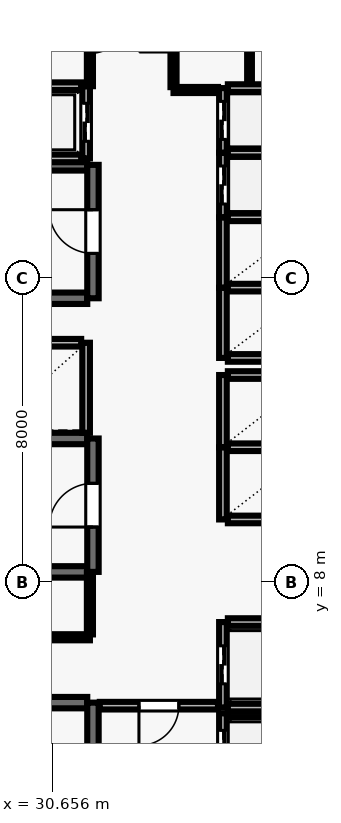
"""IFC4 building model, lengths in metres.
Left out: names, types, materials, properties, quantities, classifications, styles, units other than length and angle.
Written with IfcOpenShell. Run it as: python <this file> out.ifc"""

import sys

from ifc_helpers import new_model, si_unit, direction, frame, frame_2d, origin, place, context, subcontext, project, spatial, rectangle, extrude, element, fill, save


model = new_model("IFC4")
c1 = context("Model", 3, precision=1e-05, world=origin(), true_north=direction((0.0, 1.0)))
c2 = subcontext(c1, "Body", "Model", "MODEL_VIEW")
j1 = project(units=[si_unit("LENGTHUNIT", "METRE"), si_unit("PLANEANGLEUNIT", "RADIAN")], contexts=[c1])
p1 = place(None, origin())
s1 = spatial("IfcSite", under=j1, at=p1, CompositionType="ELEMENT")
p2 = place(p1, origin())
s2 = spatial("IfcBuilding", under=s1, at=p2, CompositionType="ELEMENT")
p3 = place(p2, frame((0.0, 0.0, 107.3)))
s3 = spatial("IfcBuildingStorey", under=s2, at=p3, CompositionType="ELEMENT", Elevation=107.3)
p4 = place(p3, frame((31.58, 4.83, 0.0), z_axis=(0.0, 0.0, 1.0), x_axis=(-1.0, 0.0, 0.0)))
e1 = element("IfcWall", 1, at=p4, inside=s3, PredefinedType="SHEAR", context=c2, shape_type="SweptSolid", body=[
    extrude(rectangle(XDim=8.36, YDim=0.3, at=frame_2d((4.18, 0.0))), origin(), (0.0, 0.0, 1.0), 3.69),
])
p5 = place(p3, frame((31.73, 0.96, 0.0), z_axis=(0.0, 0.0, 1.0), x_axis=(0.0, 1.0, 0.0)))
e2 = element("IfcWall", 2, at=p5, inside=s3, PredefinedType="SHEAR", context=c2, shape_type="SweptSolid", body=[
    extrude(rectangle(XDim=3.87, YDim=0.3, at=frame_2d((1.935, 0.0))), origin(), (0.0, 0.0, 1.0), 3.69),
])
p6 = place(p5, frame((1.54, 0.0, 0.0)))
e3 = element("IfcOpeningElement", 3, at=p6, cuts=e2, PredefinedType="OPENING", context=c2, shape_type="SweptSolid", body=[
    extrude(rectangle(XDim=1.15, YDim=2.15, at=frame_2d((0.575, 1.075))), frame((0.0, 0.16, 0.0), z_axis=(0.0, -1.0, 0.0), x_axis=(1.0, 0.0, 0.0)), (0.0, 0.0, 1.0), 0.32),
])
for number, where, z_axis, x_axis in (
    (4, (31.58, 18.98, 0.0), (0.0, 0.0, 1.0), (-1.0, 0.0, 0.0)),
    (5, (23.22, 15.47, 0.0), (0.0, 0.0, 1.0), (1.0, 0.0, 0.0)),
):
    element("IfcWall", number, at=place(p3, frame(where, z_axis=z_axis, x_axis=x_axis)), inside=s3, PredefinedType="SHEAR", context=c2, shape_type="SweptSolid", body=[
        extrude(rectangle(XDim=8.36, YDim=0.3, at=frame_2d((4.18, 0.0))), origin(), (0.0, 0.0, 1.0), 3.69),
    ])
p7 = place(p3, frame((31.73, 15.47, 0.0), z_axis=(0.0, 0.0, 1.0), x_axis=(0.0, 1.0, 0.0)))
e6 = element("IfcWall", 6, at=p7, inside=s3, PredefinedType="SHEAR", context=c2, shape_type="SweptSolid", body=[
    extrude(rectangle(XDim=3.51, YDim=0.3, at=frame_2d((1.755, 0.0))), origin(), (0.0, 0.0, 1.0), 3.69),
])
p8 = place(p7, frame((1.18, 0.0, 0.0)))
e7 = element("IfcOpeningElement", 7, at=p8, cuts=e6, PredefinedType="OPENING", context=c2, shape_type="SweptSolid", body=[
    extrude(rectangle(XDim=1.15, YDim=2.15, at=frame_2d((0.575, 1.075))), frame((0.0, 0.16, 0.0), z_axis=(0.0, -1.0, 0.0), x_axis=(1.0, 0.0, 0.0)), (0.0, 0.0, 1.0), 0.32),
])
for number, where, z_axis, x_axis in (
    (8, (31.58, 11.78, 0.0), (0.0, 0.0, 1.0), (-1.0, 0.0, 0.0)),
    (9, (23.22, 8.27, 0.0), (0.0, 0.0, 1.0), (1.0, 0.0, 0.0)),
):
    element("IfcWall", number, at=place(p3, frame(where, z_axis=z_axis, x_axis=x_axis)), inside=s3, PredefinedType="SHEAR", context=c2, shape_type="SweptSolid", body=[
        extrude(rectangle(XDim=8.36, YDim=0.3, at=frame_2d((4.18, 0.0))), origin(), (0.0, 0.0, 1.0), 3.69),
    ])
p9 = place(p3, frame((31.73, 8.27, 0.0), z_axis=(0.0, 0.0, 1.0), x_axis=(0.0, 1.0, 0.0)))
e10 = element("IfcWall", 10, at=p9, inside=s3, PredefinedType="SHEAR", context=c2, shape_type="SweptSolid", body=[
    extrude(rectangle(XDim=3.51, YDim=0.3, at=frame_2d((1.755, 0.0))), origin(), (0.0, 0.0, 1.0), 3.69),
])
p10 = place(p9, frame((1.18, 0.0, 0.0)))
e11 = element("IfcOpeningElement", 11, at=p10, cuts=e10, PredefinedType="OPENING", context=c2, shape_type="SweptSolid", body=[
    extrude(rectangle(XDim=1.15, YDim=2.15, at=frame_2d((0.575, 1.075))), frame((0.0, 0.16, 0.0), z_axis=(0.0, -1.0, 0.0), x_axis=(1.0, 0.0, 0.0)), (0.0, 0.0, 1.0), 0.32),
])
p11 = place(p3, frame((35.15, 4.55, 0.0), z_axis=(0.0, 0.0, 1.0), x_axis=(0.0, -1.0, 0.0)))
e12 = element("IfcWall", 12, at=p11, inside=s3, PredefinedType="SOLIDWALL", context=c2, shape_type="SweptSolid", body=[
    extrude(rectangle(XDim=2.1, YDim=0.2, at=frame_2d((1.05, 0.0))), origin(), (0.0, 0.0, 1.0), 3.69),
])
p12 = place(p11, frame((0.45, 0.0, 0.0)))
e13 = element("IfcOpeningElement", 13, at=p12, cuts=e12, PredefinedType="OPENING", context=c2, shape_type="SweptSolid", body=[
    extrude(rectangle(XDim=1.2, YDim=2.15, at=frame_2d((0.6, 1.075))), frame((0.0, 0.11, 0.0), z_axis=(0.0, -1.0, 0.0), x_axis=(1.0, 0.0, 0.0)), (0.0, 0.0, 1.0), 0.22),
])
p13 = place(p3, frame((37.42, 4.55, 0.0), z_axis=(0.0, 0.0, 1.0), x_axis=(-1.0, 0.0, 0.0)))
e14 = element("IfcWall", 14, at=p13, inside=s3, PredefinedType="SOLIDWALL", context=c2, shape_type="SweptSolid", body=[
    extrude(rectangle(XDim=2.14, YDim=0.2, at=frame_2d((1.07, 0.0))), origin(), (0.0, 0.0, 1.0), 3.69),
])
p14 = place(p3, frame((35.15, 6.95, 0.0), z_axis=(0.0, 0.0, 1.0), x_axis=(0.0, -1.0, 0.0)))
e15 = element("IfcWall", 15, at=p14, inside=s3, PredefinedType="SOLIDWALL", context=c2, shape_type="SweptSolid", body=[
    extrude(rectangle(XDim=2.25, YDim=0.2, at=frame_2d((1.125, 0.0))), origin(), (0.0, 0.0, 1.0), 3.69),
])
p15 = place(p14, frame((0.625, 0.0, 0.0)))
e16 = element("IfcOpeningElement", 16, at=p15, cuts=e15, PredefinedType="OPENING", context=c2, shape_type="SweptSolid", body=[
    extrude(rectangle(XDim=1.0, YDim=2.1, at=frame_2d((0.5, 1.05))), frame((0.0, 0.11, 0.0), z_axis=(0.0, -1.0, 0.0), x_axis=(1.0, 0.0, 0.0)), (0.0, 0.0, 1.0), 0.22),
])
for number, where, z_axis, x_axis in (
    (17, (35.28, 4.7, 0.0), (0.0, 0.0, 1.0), (1.0, 0.0, 0.0)),
    (18, (37.42, 6.95, 0.0), (0.0, 0.0, 1.0), (-1.0, 0.0, 0.0)),
):
    element("IfcWall", number, at=place(p3, frame(where, z_axis=z_axis, x_axis=x_axis)), inside=s3, PredefinedType="SOLIDWALL", context=c2, shape_type="SweptSolid", body=[
        extrude(rectangle(XDim=2.14, YDim=0.2, at=frame_2d((1.07, 0.0))), origin(), (0.0, 0.0, 1.0), 3.69),
    ])
p16 = place(p3, frame((35.15, 11.55, 0.0), z_axis=(0.0, 0.0, 1.0), x_axis=(0.0, -1.0, 0.0)))
e19 = element("IfcWall", 19, at=p16, inside=s3, PredefinedType="SOLIDWALL", context=c2, shape_type="SweptSolid", body=[
    extrude(rectangle(XDim=1.9, YDim=0.2, at=frame_2d((0.95, 0.0))), origin(), (0.0, 0.0, 1.0), 3.69),
])
for number, where, z_axis, x_axis in (
    (20, (35.28, 9.65, 0.0), (0.0, 0.0, 1.0), (1.0, 0.0, 0.0)),
    (21, (37.42, 11.55, 0.0), (0.0, 0.0, 1.0), (-1.0, 0.0, 0.0)),
):
    element("IfcWall", number, at=place(p3, frame(where, z_axis=z_axis, x_axis=x_axis)), inside=s3, PredefinedType="SOLIDWALL", context=c2, shape_type="SweptSolid", body=[
        extrude(rectangle(XDim=2.14, YDim=0.2, at=frame_2d((1.07, 0.0))), origin(), (0.0, 0.0, 1.0), 3.69),
    ])
p17 = place(p3, frame((35.15, 13.45, 0.0), z_axis=(0.0, 0.0, 1.0), x_axis=(0.0, -1.0, 0.0)))
e22 = element("IfcWall", 22, at=p17, inside=s3, PredefinedType="SOLIDWALL", context=c2, shape_type="SweptSolid", body=[
    extrude(rectangle(XDim=1.9, YDim=0.2, at=frame_2d((0.95, 0.0))), origin(), (0.0, 0.0, 1.0), 3.69),
])
p18 = place(p3, frame((37.42, 13.45, 0.0), z_axis=(0.0, 0.0, 1.0), x_axis=(-1.0, 0.0, 0.0)))
e23 = element("IfcWall", 23, at=p18, inside=s3, PredefinedType="SOLIDWALL", context=c2, shape_type="SweptSolid", body=[
    extrude(rectangle(XDim=2.14, YDim=0.2, at=frame_2d((1.07, 0.0))), origin(), (0.0, 0.0, 1.0), 3.69),
])
p19 = place(p3, frame((31.55, 11.93, 0.0), z_axis=(0.0, 0.0, 1.0), x_axis=(0.0, 1.0, 0.0)))
e24 = element("IfcWall", 24, at=p19, inside=s3, PredefinedType="SOLIDWALL", context=c2, shape_type="SweptSolid", body=[
    extrude(rectangle(XDim=2.37, YDim=0.2, at=frame_2d((1.185, 0.0))), origin(), (0.0, 0.0, 1.0), 3.69),
])
p20 = place(p3, frame((31.42, 14.3, 0.0), z_axis=(0.0, 0.0, 1.0), x_axis=(-1.0, 0.0, 0.0)))
e25 = element("IfcWall", 25, at=p20, inside=s3, PredefinedType="SOLIDWALL", context=c2, shape_type="SweptSolid", body=[
    extrude(rectangle(XDim=2.44, YDim=0.2, at=frame_2d((1.22, 0.0))), origin(), (0.0, 0.0, 1.0), 3.69),
])
p21 = place(p3, frame((35.15, 15.75, 0.0), z_axis=(0.0, 0.0, 1.0), x_axis=(0.0, -1.0, 0.0)))
e26 = element("IfcWall", 26, at=p21, inside=s3, PredefinedType="SOLIDWALL", context=c2, shape_type="SweptSolid", body=[
    extrude(rectangle(XDim=1.85, YDim=0.2, at=frame_2d((0.925, 0.0))), origin(), (0.0, 0.0, 1.0), 3.69),
])
for number, where, z_axis, x_axis in (
    (27, (35.28, 13.9, 0.0), (0.0, 0.0, 1.0), (1.0, 0.0, 0.0)),
    (28, (37.42, 15.75, 0.0), (0.0, 0.0, 1.0), (-1.0, 0.0, 0.0)),
):
    element("IfcWall", number, at=place(p3, frame(where, z_axis=z_axis, x_axis=x_axis)), inside=s3, PredefinedType="SOLIDWALL", context=c2, shape_type="SweptSolid", body=[
        extrude(rectangle(XDim=2.14, YDim=0.2, at=frame_2d((1.07, 0.0))), origin(), (0.0, 0.0, 1.0), 3.69),
    ])
p22 = place(p3, frame((35.15, 17.6, 0.0), z_axis=(0.0, 0.0, 1.0), x_axis=(0.0, -1.0, 0.0)))
e29 = element("IfcWall", 29, at=p22, inside=s3, PredefinedType="SOLIDWALL", context=c2, shape_type="SweptSolid", body=[
    extrude(rectangle(XDim=1.85, YDim=0.2, at=frame_2d((0.925, 0.0))), origin(), (0.0, 0.0, 1.0), 3.69),
])
p23 = place(p3, frame((37.42, 17.6, 0.0), z_axis=(0.0, 0.0, 1.0), x_axis=(-1.0, 0.0, 0.0)))
e30 = element("IfcWall", 30, at=p23, inside=s3, PredefinedType="SOLIDWALL", context=c2, shape_type="SweptSolid", body=[
    extrude(rectangle(XDim=2.14, YDim=0.2, at=frame_2d((1.07, 0.0))), origin(), (0.0, 0.0, 1.0), 3.69),
])
p24 = place(p3, frame((35.15, 19.3, 0.0), z_axis=(0.0, 0.0, 1.0), x_axis=(0.0, -1.0, 0.0)))
e31 = element("IfcWall", 31, at=p24, inside=s3, PredefinedType="SOLIDWALL", context=c2, shape_type="SweptSolid", body=[
    extrude(rectangle(XDim=1.7, YDim=0.2, at=frame_2d((0.85, 0.0))), origin(), (0.0, 0.0, 1.0), 3.69),
])
p25 = place(p24, frame((0.35, 0.0, 0.0)))
e32 = element("IfcOpeningElement", 32, at=p25, cuts=e31, PredefinedType="OPENING", context=c2, shape_type="SweptSolid", body=[
    extrude(rectangle(XDim=1.0, YDim=2.1, at=frame_2d((0.5, 1.05))), frame((0.0, 0.11, 0.0), z_axis=(0.0, -1.0, 0.0), x_axis=(1.0, 0.0, 0.0)), (0.0, 0.0, 1.0), 0.22),
])
p26 = place(p3, frame((37.42, 19.3, 0.0), z_axis=(0.0, 0.0, 1.0), x_axis=(-1.0, 0.0, 0.0)))
e33 = element("IfcWall", 33, at=p26, inside=s3, PredefinedType="SOLIDWALL", context=c2, shape_type="SweptSolid", body=[
    extrude(rectangle(XDim=2.14, YDim=0.2, at=frame_2d((1.07, 0.0))), origin(), (0.0, 0.0, 1.0), 3.69),
])
p27 = place(p3, frame((35.15, 21.0, 0.0), z_axis=(0.0, 0.0, 1.0), x_axis=(0.0, -1.0, 0.0)))
e34 = element("IfcWall", 34, at=p27, inside=s3, PredefinedType="SOLIDWALL", context=c2, shape_type="SweptSolid", body=[
    extrude(rectangle(XDim=1.7, YDim=0.2, at=frame_2d((0.85, 0.0))), origin(), (0.0, 0.0, 1.0), 3.69),
])
p28 = place(p27, frame((0.35, 0.0, 0.0)))
e35 = element("IfcOpeningElement", 35, at=p28, cuts=e34, PredefinedType="OPENING", context=c2, shape_type="SweptSolid", body=[
    extrude(rectangle(XDim=1.0, YDim=2.1, at=frame_2d((0.5, 1.05))), frame((0.0, 0.11, 0.0), z_axis=(0.0, -1.0, 0.0), x_axis=(1.0, 0.0, 0.0)), (0.0, 0.0, 1.0), 0.22),
])
p29 = place(p3, frame((37.42, 21.0, 0.0), z_axis=(0.0, 0.0, 1.0), x_axis=(-1.0, 0.0, 0.0)))
e36 = element("IfcWall", 36, at=p29, inside=s3, PredefinedType="SOLIDWALL", context=c2, shape_type="SweptSolid", body=[
    extrude(rectangle(XDim=2.14, YDim=0.2, at=frame_2d((1.07, 0.0))), origin(), (0.0, 0.0, 1.0), 3.69),
])
p30 = place(p3, frame((31.55, 19.15, 0.0), z_axis=(0.0, 0.0, 1.0), x_axis=(0.0, 1.0, 0.0)))
e37 = element("IfcWall", 37, at=p30, inside=s3, PredefinedType="SOLIDWALL", context=c2, shape_type="SweptSolid", body=[
    extrude(rectangle(XDim=1.9, YDim=0.2, at=frame_2d((0.95, 0.0))), origin(), (0.0, 0.0, 1.0), 3.69),
])
p31 = place(p30, frame((0.45, 0.0, 0.0)))
e38 = element("IfcOpeningElement", 38, at=p31, cuts=e37, PredefinedType="OPENING", context=c2, shape_type="SweptSolid", body=[
    extrude(rectangle(XDim=1.0, YDim=2.1, at=frame_2d((0.5, 1.05))), frame((0.0, 0.11, 0.0), z_axis=(0.0, -1.0, 0.0), x_axis=(1.0, 0.0, 0.0)), (0.0, 0.0, 1.0), 0.22),
])
for number, where, z_axis, x_axis in (
    (39, (28.98, 19.15, 0.0), (0.0, 0.0, 1.0), (1.0, 0.0, 0.0)),
    (40, (31.42, 21.05, 0.0), (0.0, 0.0, 1.0), (-1.0, 0.0, 0.0)),
):
    element("IfcWall", number, at=place(p3, frame(where, z_axis=z_axis, x_axis=x_axis)), inside=s3, PredefinedType="SOLIDWALL", context=c2, shape_type="SweptSolid", body=[
        extrude(rectangle(XDim=2.44, YDim=0.2, at=frame_2d((1.22, 0.0))), origin(), (0.0, 0.0, 1.0), 3.69),
    ])
p32 = place(p3, frame((31.65, 6.55, 0.0), z_axis=(0.0, 0.0, 1.0), x_axis=(-1.0, 0.0, 0.0)))
e41 = element("IfcWall", 41, at=p32, inside=s3, PredefinedType="PARTITIONING", context=c2, shape_type="SweptSolid", body=[
    extrude(rectangle(XDim=4.75, YDim=0.16, at=frame_2d((2.375, 0.0))), origin(), (0.0, 0.0, 1.0), 3.69),
])
p33 = place(p32, frame((1.935, 0.0, 0.0)))
e42 = element("IfcOpeningElement", 42, at=p33, cuts=e41, PredefinedType="OPENING", context=c2, shape_type="SweptSolid", body=[
    extrude(rectangle(XDim=0.88, YDim=2.1, at=frame_2d((0.44, 1.05))), frame((0.0, 0.09, 0.0), z_axis=(0.0, -1.0, 0.0), x_axis=(1.0, 0.0, 0.0)), (0.0, 0.0, 1.0), 0.18),
])
p34 = place(p3, frame((35.02, 4.75, 0.0), z_axis=(0.0, 0.0, 1.0), x_axis=(-1.0, 0.0, 0.0)))
e43 = element("IfcWall", 43, at=p34, inside=s3, PredefinedType="SOLIDWALL", context=c2, shape_type="SweptSolid", body=[
    extrude(rectangle(XDim=3.11, YDim=0.2, at=frame_2d((1.555, 0.0))), origin(), (0.0, 0.0, 1.0), 3.69),
])
p35 = place(p34, frame((1.03, 0.0, 0.0)))
e44 = element("IfcOpeningElement", 44, at=p35, cuts=e43, PredefinedType="OPENING", context=c2, shape_type="SweptSolid", body=[
    extrude(rectangle(XDim=1.05, YDim=2.15, at=frame_2d((0.525, 1.075))), frame((0.0, 0.11, 0.0), z_axis=(0.0, -1.0, 0.0), x_axis=(1.0, 0.0, 0.0)), (0.0, 0.0, 1.0), 0.22),
])
p36 = place(p3, frame((35.02, 20.95, 0.0), z_axis=(0.0, 0.0, 1.0), x_axis=(-1.0, 0.0, 0.0)))
e45 = element("IfcWall", 45, at=p36, inside=s3, PredefinedType="PARTITIONING", context=c2, shape_type="SweptSolid", body=[
    extrude(rectangle(XDim=1.17, YDim=0.16, at=frame_2d((0.585, 0.0))), origin(), (0.0, 0.0, 1.0), 3.69),
])
p37 = place(p3, frame((31.65, 8.24, 0.0), z_axis=(0.0, 0.0, 1.0), x_axis=(0.0, -1.0, 0.0)))
e46 = element("IfcWall", 46, at=p37, inside=s3, PredefinedType="PARTITIONING", context=c2, shape_type="SweptSolid", body=[
    extrude(rectangle(XDim=1.615, YDim=0.16, at=frame_2d((0.808, 0.0))), origin(), (0.0, 0.0, 1.0), 3.69),
])
p38 = place(p3, frame((31.65, 23.775, 0.0), z_axis=(0.0, 0.0, 1.0), x_axis=(0.0, -1.0, 0.0)))
e47 = element("IfcWall", 47, at=p38, inside=s3, PredefinedType="PARTITIONING", context=c2, shape_type="SweptSolid", body=[
    extrude(rectangle(XDim=2.725, YDim=0.16, at=frame_2d((1.362, 0.0))), origin(), (0.0, 0.0, 1.0), 3.69),
])
p39 = place(p38, frame((0.862, 0.0, 0.0)))
e48 = element("IfcOpeningElement", 48, at=p39, cuts=e47, PredefinedType="OPENING", context=c2, shape_type="SweptSolid", body=[
    extrude(rectangle(XDim=1.0, YDim=2.1, at=frame_2d((0.5, 1.05))), frame((0.0, 0.09, 0.0), z_axis=(0.0, -1.0, 0.0), x_axis=(1.0, 0.0, 0.0)), (0.0, 0.0, 1.0), 0.18),
])
p40 = place(p3, frame((33.85, 21.025, 0.0), z_axis=(0.0, 0.0, 1.0), x_axis=(0.0, 1.0, 0.0)))
e49 = element("IfcWall", 49, at=p40, inside=s3, PredefinedType="PARTITIONING", context=c2, shape_type="SweptSolid", body=[
    extrude(rectangle(XDim=2.75, YDim=0.16, at=frame_2d((1.375, 0.0))), origin(), (0.0, 0.0, 1.0), 3.69),
])
p41 = place(p40, frame((0.925, 0.0, 0.0)))
e50 = element("IfcOpeningElement", 50, at=p41, cuts=e49, PredefinedType="OPENING", context=c2, shape_type="SweptSolid", body=[
    extrude(rectangle(XDim=0.9, YDim=2.1, at=frame_2d((0.45, 1.05))), frame((0.0, 0.09, 0.0), z_axis=(0.0, -1.0, 0.0), x_axis=(1.0, 0.0, 0.0)), (0.0, 0.0, 1.0), 0.18),
])
p42 = place(p3, frame((35.85, 21.13, 0.0), z_axis=(0.0, 0.0, 1.0), x_axis=(0.0, 1.0, 0.0)))
e51 = element("IfcWall", 51, at=p42, inside=s3, PredefinedType="PARTITIONING", context=c2, shape_type="SweptSolid", body=[
    extrude(rectangle(XDim=2.645, YDim=0.125, at=frame_2d((1.323, 0.0))), origin(), (0.0, 0.0, 1.0), 3.69),
])
p43 = place(p42, frame((0.872, 0.0, 0.0)))
e52 = element("IfcOpeningElement", 52, at=p43, cuts=e51, PredefinedType="OPENING", context=c2, shape_type="SweptSolid", body=[
    extrude(rectangle(XDim=0.9, YDim=2.1, at=frame_2d((0.45, 1.05))), frame((0.0, 0.073, 0.0), z_axis=(0.0, -1.0, 0.0), x_axis=(1.0, 0.0, 0.0)), (0.0, 0.0, 1.0), 0.145),
])
p44 = place(p8, origin())
e53 = element("IfcDoor", 53, at=p44, inside=s3, OperationType="SINGLE_SWING_RIGHT", PredefinedType="DOOR", context=c2, shape_type="SweptSolid", body=[
    extrude(rectangle(XDim=1.15, YDim=2.15, at=frame_2d((0.575, 1.075))), frame((0.0, 0.025, 0.0), z_axis=(0.0, -1.0, 0.0), x_axis=(1.0, 0.0, 0.0)), (0.0, 0.0, 1.0), 0.05),
])
fill(e7, e53)
p45 = place(p10, origin())
e54 = element("IfcDoor", 54, at=p45, inside=s3, OperationType="SINGLE_SWING_LEFT", PredefinedType="DOOR", context=c2, shape_type="SweptSolid", body=[
    extrude(rectangle(XDim=1.15, YDim=2.15, at=frame_2d((0.575, 1.075))), frame((0.0, 0.025, 0.0), z_axis=(0.0, -1.0, 0.0), x_axis=(1.0, 0.0, 0.0)), (0.0, 0.0, 1.0), 0.05),
])
fill(e11, e54)
p46 = place(p12, origin())
e55 = element("IfcDoor", 55, at=p46, inside=s3, OperationType="DOUBLE_DOOR_SLIDING", PredefinedType="DOOR", context=c2, shape_type="SweptSolid", body=[
    extrude(rectangle(XDim=1.2, YDim=2.15, at=frame_2d((0.6, 1.075))), frame((0.0, 0.025, 0.0), z_axis=(0.0, -1.0, 0.0), x_axis=(1.0, 0.0, 0.0)), (0.0, 0.0, 1.0), 0.05),
])
fill(e13, e55)
p47 = place(p15, origin())
e56 = element("IfcDoor", 56, at=p47, inside=s3, OperationType="DOUBLE_DOOR_SLIDING", PredefinedType="DOOR", context=c2, shape_type="SweptSolid", body=[
    extrude(rectangle(XDim=1.0, YDim=2.1, at=frame_2d((0.5, 1.05))), frame((0.0, 0.025, 0.0), z_axis=(0.0, -1.0, 0.0), x_axis=(1.0, 0.0, 0.0)), (0.0, 0.0, 1.0), 0.05),
])
fill(e16, e56)
p48 = place(p25, origin())
e57 = element("IfcDoor", 57, at=p48, inside=s3, OperationType="DOUBLE_DOOR_SLIDING", PredefinedType="DOOR", context=c2, shape_type="SweptSolid", body=[
    extrude(rectangle(XDim=1.0, YDim=2.1, at=frame_2d((0.5, 1.05))), frame((0.0, 0.025, 0.0), z_axis=(0.0, -1.0, 0.0), x_axis=(1.0, 0.0, 0.0)), (0.0, 0.0, 1.0), 0.05),
])
fill(e32, e57)
p49 = place(p28, origin())
e58 = element("IfcDoor", 58, at=p49, inside=s3, OperationType="DOUBLE_DOOR_SLIDING", PredefinedType="DOOR", context=c2, shape_type="SweptSolid", body=[
    extrude(rectangle(XDim=1.0, YDim=2.1, at=frame_2d((0.5, 1.05))), frame((0.0, 0.025, 0.0), z_axis=(0.0, -1.0, 0.0), x_axis=(1.0, 0.0, 0.0)), (0.0, 0.0, 1.0), 0.05),
])
fill(e35, e58)
p50 = place(p31, origin())
e59 = element("IfcDoor", 59, at=p50, inside=s3, OperationType="DOUBLE_DOOR_SLIDING", PredefinedType="DOOR", context=c2, shape_type="SweptSolid", body=[
    extrude(rectangle(XDim=1.0, YDim=2.1, at=frame_2d((0.5, 1.05))), frame((0.0, 0.025, 0.0), z_axis=(0.0, -1.0, 0.0), x_axis=(1.0, 0.0, 0.0)), (0.0, 0.0, 1.0), 0.05),
])
fill(e38, e59)
p51 = place(p35, origin())
e60 = element("IfcDoor", 60, at=p51, inside=s3, OperationType="SINGLE_SWING_RIGHT", PredefinedType="DOOR", context=c2, shape_type="SweptSolid", body=[
    extrude(rectangle(XDim=1.05, YDim=2.15, at=frame_2d((0.525, 1.075))), frame((0.0, 0.025, 0.0), z_axis=(0.0, -1.0, 0.0), x_axis=(1.0, 0.0, 0.0)), (0.0, 0.0, 1.0), 0.05),
])
fill(e44, e60)
p52 = place(p39, origin())
e61 = element("IfcDoor", 61, at=p52, inside=s3, OperationType="SINGLE_SWING_LEFT", PredefinedType="DOOR", context=c2, shape_type="SweptSolid", body=[
    extrude(rectangle(XDim=1.0, YDim=2.1, at=frame_2d((0.5, 1.05))), frame((0.0, 0.025, 0.0), z_axis=(0.0, -1.0, 0.0), x_axis=(1.0, 0.0, 0.0)), (0.0, 0.0, 1.0), 0.05),
])
fill(e48, e61)
save(model, sys.argv[1])
